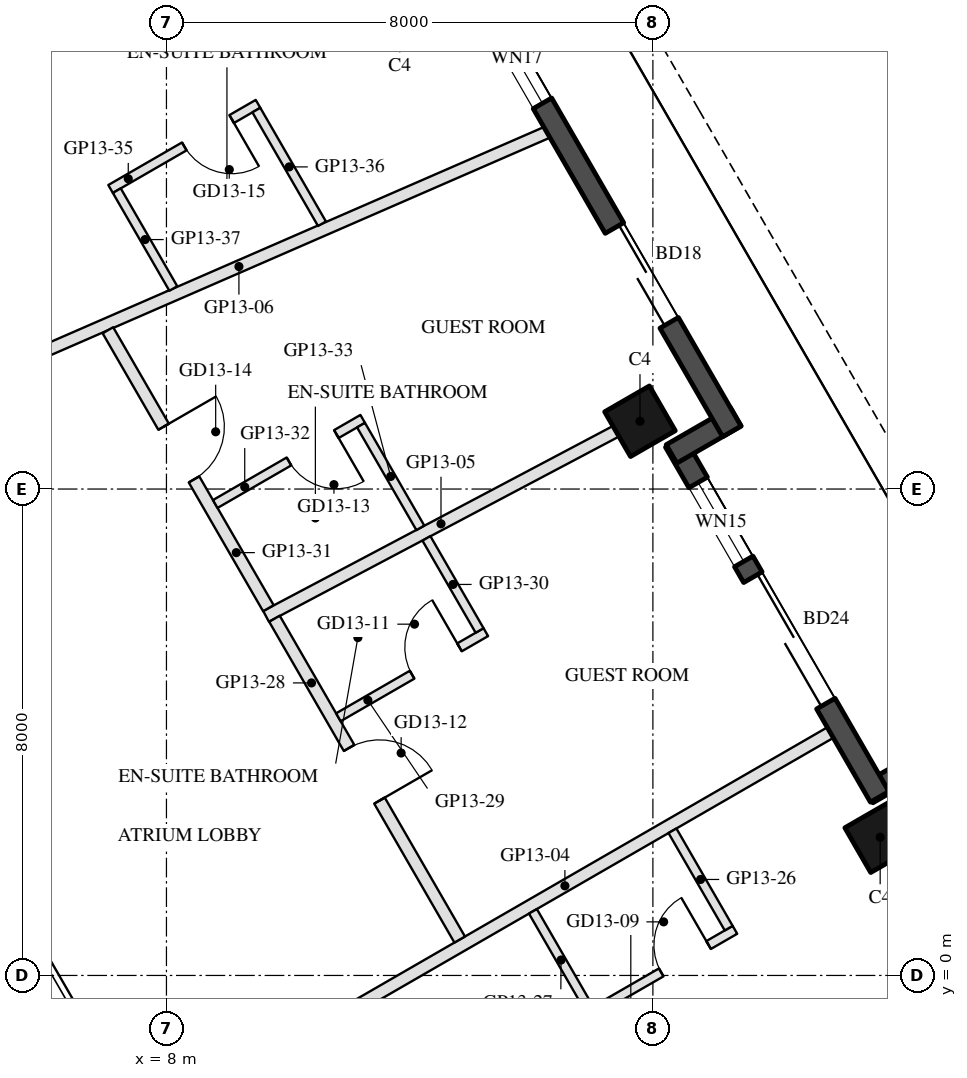
"""IFC4 building model, lengths in metres.
Left out: names, types, materials, properties, quantities, classifications, styles, units other than length and angle.
Written with IfcOpenShell. Run it as: python <this file> out.ifc"""

import sys

from ifc_helpers import new_model, si_unit, direction, frame, frame_2d, origin, origin_2d, place, context, subcontext, project, spatial, rectangle, hollow_rectangle, extrude, element, fill, save


model = new_model("IFC4")
c1 = context("Model", 3, precision=1e-05, world=origin(), true_north=direction((0.0, 1.0)))
c2 = subcontext(c1, "Body", "Model", "MODEL_VIEW")
j1 = project(units=[si_unit("LENGTHUNIT", "METRE"), si_unit("PLANEANGLEUNIT", "RADIAN")], contexts=[c1])
p1 = place(None, origin())
s1 = spatial("IfcSite", under=j1, at=p1, CompositionType="ELEMENT")
p2 = place(p1, origin())
s2 = spatial("IfcBuilding", under=s1, at=p2, CompositionType="ELEMENT")
p3 = place(p2, frame((0.0, 0.0, 154.0)))
s3 = spatial("IfcBuildingStorey", under=s2, at=p3, CompositionType="ELEMENT", Elevation=154.0)
for number, where, z_axis, x_axis in (
    (1, (19.738, 2.273, 0.0), (0.0, 0.0, 1.0), (-0.5, 0.866, 0.0)),
    (2, (15.788, 9.115, 0.0), (0.0, 0.0, 1.0), (-0.5, 0.866, 0.0)),
):
    element("IfcColumn", number, at=place(p3, frame(where, z_axis=z_axis, x_axis=x_axis)), inside=s3, PredefinedType="COLUMN", context=c2, shape_type="SweptSolid", body=[
        extrude(hollow_rectangle(XDim=0.85, YDim=0.85, WallThickness=0.04, at=origin_2d()), origin(), (0.0, 0.0, 1.0), 3.7),
    ])
p4 = place(p3, frame((20.588, 3.601, 0.0), z_axis=(0.0, 0.0, 1.0), x_axis=(-0.866005645448, -0.500034220881, 0.0)))
e3 = element("IfcWall", 3, at=p4, inside=s3, PredefinedType="SOLIDWALL", context=c2, shape_type="SweptSolid", body=[
    extrude(rectangle(XDim=1.22, YDim=0.35, at=frame_2d((0.61, 0.0))), origin(), (0.0, 0.0, 1.0), 3.55),
])
p5 = place(p3, frame((19.729, 2.938, 0.0), z_axis=(0.0, 0.0, 1.0), x_axis=(-0.499976430342, 0.866039011305, 0.0)))
e4 = element("IfcWall", 4, at=p5, inside=s3, PredefinedType="SOLIDWALL", context=c2, shape_type="SweptSolid", body=[
    extrude(rectangle(XDim=6.74, YDim=0.35, at=frame_2d((3.37, 0.0))), origin(), (0.0, 0.0, 1.0), 3.55),
])
p6 = place(p5, frame((1.77, 0.0, 0.0)))
e5 = element("IfcOpeningElement", 5, at=p6, cuts=e4, PredefinedType="OPENING", context=c2, shape_type="SweptSolid", body=[
    extrude(rectangle(XDim=2.4, YDim=2.4, at=frame_2d((1.2, 1.2))), frame((0.0, 0.185, 0.0), z_axis=(0.0, -1.0, 0.0), x_axis=(1.0, 0.0, 0.0)), (0.0, 0.0, 1.0), 0.37),
])
p7 = place(p5, frame((4.47, 0.0, 0.3)))
e6 = element("IfcOpeningElement", 6, at=p7, cuts=e4, PredefinedType="OPENING", context=c2, shape_type="SweptSolid", body=[
    extrude(rectangle(XDim=1.5, YDim=2.65, at=frame_2d((0.75, 1.325))), frame((0.0, 0.185, 0.0), z_axis=(0.0, -1.0, 0.0), x_axis=(1.0, 0.0, 0.0)), (0.0, 0.0, 1.0), 0.37),
])
p8 = place(p3, frame((16.306, 8.577, 0.0), z_axis=(0.0, 0.0, 1.0), x_axis=(0.866092288191, 0.499884134912, 0.0)))
e7 = element("IfcWall", 7, at=p8, inside=s3, PredefinedType="SOLIDWALL", context=c2, shape_type="SweptSolid", body=[
    extrude(rectangle(XDim=1.22, YDim=0.35, at=frame_2d((0.61, 0.0))), origin(), (0.0, 0.0, 1.0), 3.55),
])
p9 = place(p3, frame((17.299, 8.948, 0.0), z_axis=(0.0, 0.0, 1.0), x_axis=(-0.500010041276, 0.866019606374, 0.0)))
e8 = element("IfcWall", 8, at=p9, inside=s3, PredefinedType="SOLIDWALL", context=c2, shape_type="SweptSolid", body=[
    extrude(rectangle(XDim=9.7, YDim=0.35, at=frame_2d((4.85, 0.0))), origin(), (0.0, 0.0, 1.0), 3.55),
])
p10 = place(p9, frame((2.062, 0.0, 0.0)))
e9 = element("IfcOpeningElement", 9, at=p10, cuts=e8, PredefinedType="OPENING", context=c2, shape_type="SweptSolid", body=[
    extrude(rectangle(XDim=1.8, YDim=2.4, at=frame_2d((0.9, 1.2))), frame((0.0, 0.185, 0.0), z_axis=(0.0, -1.0, 0.0), x_axis=(1.0, 0.0, 0.0)), (0.0, 0.0, 1.0), 0.37),
])
p11 = place(p9, frame((6.23, 0.0, 0.3)))
e10 = element("IfcOpeningElement", 10, at=p11, cuts=e8, PredefinedType="OPENING", context=c2, shape_type="SweptSolid", body=[
    extrude(rectangle(XDim=1.7, YDim=2.65, at=frame_2d((0.85, 1.325))), frame((0.0, 0.185, 0.0), z_axis=(0.0, -1.0, 0.0), x_axis=(1.0, 0.0, 0.0)), (0.0, 0.0, 1.0), 0.37),
])
p12 = place(p3, frame((18.917, 3.994, 0.0), z_axis=(0.0, 0.0, 1.0), x_axis=(-0.866022637375, -0.500004791531, 0.0)))
e11 = element("IfcWall", 11, at=p12, inside=s3, PredefinedType="PARTITIONING", context=c2, shape_type="SweptSolid", body=[
    extrude(rectangle(XDim=10.08, YDim=0.2, at=frame_2d((5.04, 0.0))), origin(), (0.0, 0.0, 1.0), 3.06),
])
p13 = place(p3, frame((15.392, 8.95, 0.0), z_axis=(0.0, 0.0, 1.0), x_axis=(-0.883969397176, -0.467544762408, 0.0)))
e12 = element("IfcWall", 12, at=p13, inside=s3, PredefinedType="PARTITIONING", context=c2, shape_type="SweptSolid", body=[
    extrude(rectangle(XDim=6.51, YDim=0.2, at=frame_2d((3.255, 0.0))), origin(), (0.0, 0.0, 1.0), 2.95),
])
p14 = place(p3, frame((14.257, 13.866, 0.0), z_axis=(0.0, 0.0, 1.0), x_axis=(-0.916761733334, -0.399434505638, 0.0)))
e13 = element("IfcWall", 13, at=p14, inside=s3, PredefinedType="PARTITIONING", context=c2, shape_type="SweptSolid", body=[
    extrude(rectangle(XDim=11.05, YDim=0.2, at=frame_2d((5.525, 0.0))), origin(), (0.0, 0.0, 1.0), 3.06),
])
p15 = place(p3, frame((14.924, -0.65, 0.0), z_axis=(0.0, 0.0, 1.0), x_axis=(0.866056369097, 0.49994636267, 0.0)))
e14 = element("IfcWall", 14, at=p15, inside=s3, PredefinedType="PARTITIONING", context=c2, shape_type="SweptSolid", body=[
    extrude(rectangle(XDim=2.8, YDim=0.15, at=frame_2d((1.4, 0.0))), origin(), (0.0, 0.0, 1.0), 2.95),
])
p16 = place(p15, frame((1.4, 0.0, 0.0)))
e15 = element("IfcOpeningElement", 15, at=p16, cuts=e14, PredefinedType="OPENING", context=c2, shape_type="SweptSolid", body=[
    extrude(rectangle(XDim=0.9, YDim=2.1, at=frame_2d((0.45, 1.05))), frame((0.0, 0.085, 0.0), z_axis=(0.0, -1.0, 0.0), x_axis=(1.0, 0.0, 0.0)), (0.0, 0.0, 1.0), 0.17),
])
for number, where, z_axis, x_axis in (
    (16, (17.247, 0.778, 0.0), (0.0, 0.0, 1.0), (-0.5, 0.866, 0.0)),
    (17, (14.952, -0.547, 0.0), (0.0, 0.0, 1.0), (-0.5, 0.866, 0.0)),
):
    element("IfcWall", number, at=place(p3, frame(where, z_axis=z_axis, x_axis=x_axis)), inside=s3, PredefinedType="PARTITIONING", context=c2, shape_type="SweptSolid", body=[
        extrude(rectangle(XDim=1.85, YDim=0.15, at=frame_2d((0.925, 0.0))), origin(), (0.0, 0.0, 1.0), 2.95),
    ])
p17 = place(p3, frame((9.777, 5.867, 0.0), z_axis=(0.0, 0.0, 1.0), x_axis=(0.499996493545, -0.866027428228, 0.0)))
e18 = element("IfcWall", 18, at=p17, inside=s3, PredefinedType="PARTITIONING", context=c2, shape_type="SweptSolid", body=[
    extrude(rectangle(XDim=6.092, YDim=0.2, at=frame_2d((3.046, 0.0))), origin(), (0.0, 0.0, 1.0), 2.95),
])
p18 = place(p17, frame((2.454, 0.0, 0.0)))
e19 = element("IfcOpeningElement", 19, at=p18, cuts=e18, PredefinedType="OPENING", context=c2, shape_type="SweptSolid", body=[
    extrude(rectangle(XDim=1.0, YDim=2.1, at=frame_2d((0.5, 1.05))), frame((0.0, 0.11, 0.0), z_axis=(0.0, -1.0, 0.0), x_axis=(1.0, 0.0, 0.0)), (0.0, 0.0, 1.0), 0.22),
])
p19 = place(p3, frame((10.827, 4.246, 0.0), z_axis=(0.0, 0.0, 1.0), x_axis=(0.866018616679, 0.500011755427, 0.0)))
e20 = element("IfcWall", 20, at=p19, inside=s3, PredefinedType="PARTITIONING", context=c2, shape_type="SweptSolid", body=[
    extrude(rectangle(XDim=2.8, YDim=0.15, at=frame_2d((1.4, 0.0))), origin(), (0.0, 0.0, 1.0), 3.55),
])
p20 = place(p19, frame((1.4, 0.0, 0.0)))
e21 = element("IfcOpeningElement", 21, at=p20, cuts=e20, PredefinedType="OPENING", context=c2, shape_type="SweptSolid", body=[
    extrude(rectangle(XDim=0.9, YDim=2.1, at=frame_2d((0.45, 1.05))), frame((0.0, 0.085, 0.0), z_axis=(0.0, -1.0, 0.0), x_axis=(1.0, 0.0, 0.0)), (0.0, 0.0, 1.0), 0.17),
])
p21 = place(p3, frame((13.15, 5.674, 0.0), z_axis=(0.0, 0.0, 1.0), x_axis=(-0.500012451049, 0.866018215049, 0.0)))
e22 = element("IfcWall", 22, at=p21, inside=s3, PredefinedType="PARTITIONING", context=c2, shape_type="SweptSolid", body=[
    extrude(rectangle(XDim=1.749, YDim=0.15, at=frame_2d((0.875, 0.0))), origin(), (0.0, 0.0, 1.0), 2.95),
])
p22 = place(p3, frame((7.037, 10.611, 0.0), z_axis=(0.0, 0.0, 1.0), x_axis=(0.500004030971, -0.86602307649, 0.0)))
e23 = element("IfcWall", 23, at=p22, inside=s3, PredefinedType="PARTITIONING", context=c2, shape_type="SweptSolid", body=[
    extrude(rectangle(XDim=5.279, YDim=0.2, at=frame_2d((2.639, 0.0))), origin(), (0.0, 0.0, 1.0), 2.95),
])
p23 = place(p22, frame((1.833, 0.0, 0.0)))
e24 = element("IfcOpeningElement", 24, at=p23, cuts=e23, PredefinedType="OPENING", context=c2, shape_type="SweptSolid", body=[
    extrude(rectangle(XDim=1.0, YDim=2.1, at=frame_2d((0.5, 1.05))), frame((0.0, 0.11, 0.0), z_axis=(0.0, -1.0, 0.0), x_axis=(1.0, 0.0, 0.0)), (0.0, 0.0, 1.0), 0.22),
])
p24 = place(p3, frame((11.227, 9.154, 0.0), z_axis=(0.0, 0.0, 1.0), x_axis=(-0.866034573852, -0.49998411664, 0.0)))
e25 = element("IfcWall", 25, at=p24, inside=s3, PredefinedType="PARTITIONING", context=c2, shape_type="SweptSolid", body=[
    extrude(rectangle(XDim=2.8, YDim=0.15, at=frame_2d((1.4, 0.0))), origin(), (0.0, 0.0, 1.0), 3.55),
])
p25 = place(p24, frame((0.5, 0.0, 0.0)))
e26 = element("IfcOpeningElement", 26, at=p25, cuts=e25, PredefinedType="OPENING", context=c2, shape_type="SweptSolid", body=[
    extrude(rectangle(XDim=0.9, YDim=2.1, at=frame_2d((0.45, 1.05))), frame((0.0, 0.085, 0.0), z_axis=(0.0, -1.0, 0.0), x_axis=(1.0, 0.0, 0.0)), (0.0, 0.0, 1.0), 0.17),
])
p26 = place(p3, frame((12.175, 7.362, 0.0), z_axis=(0.0, 0.0, 1.0), x_axis=(-0.500014901547, 0.866016800201, 0.0)))
e27 = element("IfcWall", 27, at=p26, inside=s3, PredefinedType="PARTITIONING", context=c2, shape_type="SweptSolid", body=[
    extrude(rectangle(XDim=1.951, YDim=0.15, at=frame_2d((0.976, 0.0))), origin(), (0.0, 0.0, 1.0), 3.55),
])
p27 = place(p3, frame((9.506, 14.335, 0.0), z_axis=(0.0, 0.0, 1.0), x_axis=(-0.866056369097, -0.49994636267, 0.0)))
e28 = element("IfcWall", 28, at=p27, inside=s3, PredefinedType="PARTITIONING", context=c2, shape_type="SweptSolid", body=[
    extrude(rectangle(XDim=2.8, YDim=0.15, at=frame_2d((1.4, 0.0))), origin(), (0.0, 0.0, 1.0), 3.55),
])
p28 = place(p27, frame((0.5, 0.0, 0.0)))
e29 = element("IfcOpeningElement", 29, at=p28, cuts=e28, PredefinedType="OPENING", context=c2, shape_type="SweptSolid", body=[
    extrude(rectangle(XDim=0.9, YDim=2.1, at=frame_2d((0.45, 1.05))), frame((0.0, 0.085, 0.0), z_axis=(0.0, -1.0, 0.0), x_axis=(1.0, 0.0, 0.0)), (0.0, 0.0, 1.0), 0.17),
])
p29 = place(p3, frame((10.558, 12.364, 0.0), z_axis=(0.0, 0.0, 1.0), x_axis=(-0.499983569942, 0.866034889475, 0.0)))
e30 = element("IfcWall", 30, at=p29, inside=s3, PredefinedType="PARTITIONING", context=c2, shape_type="SweptSolid", body=[
    extrude(rectangle(XDim=2.158, YDim=0.15, at=frame_2d((1.079, 0.0))), origin(), (0.0, 0.0, 1.0), 3.55),
])
p30 = place(p3, frame((8.113, 11.298, 0.0), z_axis=(0.0, 0.0, 1.0), x_axis=(-0.49995366312, 0.866052154742, 0.0)))
e31 = element("IfcWall", 31, at=p30, inside=s3, PredefinedType="PARTITIONING", context=c2, shape_type="SweptSolid", body=[
    extrude(rectangle(XDim=1.859, YDim=0.15, at=frame_2d((0.929, 0.0))), origin(), (0.0, 0.0, 1.0), 3.55),
])
p31 = place(p6, frame((2.4, 0.0, 0.0), z_axis=(0.0, 0.0, 1.0), x_axis=(-1.0, 0.0, 0.0)))
e32 = element("IfcDoor", 32, at=p31, inside=s3, OperationType="SLIDING_TO_LEFT", PredefinedType="DOOR", context=c2, shape_type="SweptSolid", body=[
    extrude(rectangle(XDim=2.4, YDim=2.4, at=frame_2d((1.2, 1.2))), frame((0.0, 0.025, 0.0), z_axis=(0.0, -1.0, 0.0), x_axis=(1.0, 0.0, 0.0)), (0.0, 0.0, 1.0), 0.05),
])
fill(e5, e32)
p32 = place(p7, origin())
e33 = element("IfcWindow", 33, at=p32, inside=s3, PartitioningType="SINGLE_PANEL", PredefinedType="WINDOW", context=c2, shape_type="SweptSolid", body=[
    extrude(rectangle(XDim=1.5, YDim=2.65, at=frame_2d((0.75, 1.325))), frame((0.0, 0.03, 0.0), z_axis=(0.0, -1.0, 0.0), x_axis=(1.0, 0.0, 0.0)), (0.0, 0.0, 1.0), 0.06),
])
fill(e6, e33)
p33 = place(p10, frame((1.8, 0.0, 0.0), z_axis=(0.0, 0.0, 1.0), x_axis=(-1.0, 0.0, 0.0)))
e34 = element("IfcDoor", 34, at=p33, inside=s3, OperationType="SLIDING_TO_LEFT", PredefinedType="DOOR", context=c2, shape_type="SweptSolid", body=[
    extrude(rectangle(XDim=1.8, YDim=2.4, at=frame_2d((0.9, 1.2))), frame((0.0, 0.025, 0.0), z_axis=(0.0, -1.0, 0.0), x_axis=(1.0, 0.0, 0.0)), (0.0, 0.0, 1.0), 0.05),
])
fill(e9, e34)
p34 = place(p11, origin())
e35 = element("IfcWindow", 35, at=p34, inside=s3, PartitioningType="SINGLE_PANEL", PredefinedType="WINDOW", context=c2, shape_type="SweptSolid", body=[
    extrude(rectangle(XDim=1.7, YDim=2.65, at=frame_2d((0.85, 1.325))), frame((0.0, 0.03, 0.0), z_axis=(0.0, -1.0, 0.0), x_axis=(1.0, 0.0, 0.0)), (0.0, 0.0, 1.0), 0.06),
])
fill(e10, e35)
p35 = place(p16, origin())
e36 = element("IfcDoor", 36, at=p35, inside=s3, OperationType="SINGLE_SWING_RIGHT", PredefinedType="DOOR", context=c2, shape_type="SweptSolid", body=[
    extrude(rectangle(XDim=0.9, YDim=2.1, at=frame_2d((0.45, 1.05))), frame((0.0, 0.025, 0.0), z_axis=(0.0, -1.0, 0.0), x_axis=(1.0, 0.0, 0.0)), (0.0, 0.0, 1.0), 0.05),
])
fill(e15, e36)
p36 = place(p20, origin())
e37 = element("IfcDoor", 37, at=p36, inside=s3, OperationType="SINGLE_SWING_RIGHT", PredefinedType="DOOR", context=c2, shape_type="SweptSolid", body=[
    extrude(rectangle(XDim=0.9, YDim=2.1, at=frame_2d((0.45, 1.05))), frame((0.0, 0.025, 0.0), z_axis=(0.0, -1.0, 0.0), x_axis=(1.0, 0.0, 0.0)), (0.0, 0.0, 1.0), 0.05),
])
fill(e21, e37)
p37 = place(p18, origin())
e38 = element("IfcDoor", 38, at=p37, inside=s3, OperationType="SINGLE_SWING_RIGHT", PredefinedType="DOOR", context=c2, shape_type="SweptSolid", body=[
    extrude(rectangle(XDim=1.0, YDim=2.1, at=frame_2d((0.5, 1.05))), frame((0.0, 0.025, 0.0), z_axis=(0.0, -1.0, 0.0), x_axis=(1.0, 0.0, 0.0)), (0.0, 0.0, 1.0), 0.05),
])
fill(e19, e38)
p38 = place(p25, origin())
e39 = element("IfcDoor", 39, at=p38, inside=s3, OperationType="SINGLE_SWING_LEFT", PredefinedType="DOOR", context=c2, shape_type="SweptSolid", body=[
    extrude(rectangle(XDim=0.9, YDim=2.1, at=frame_2d((0.45, 1.05))), frame((0.0, 0.025, 0.0), z_axis=(0.0, -1.0, 0.0), x_axis=(1.0, 0.0, 0.0)), (0.0, 0.0, 1.0), 0.05),
])
fill(e26, e39)
p39 = place(p23, origin())
e40 = element("IfcDoor", 40, at=p39, inside=s3, OperationType="SINGLE_SWING_LEFT", PredefinedType="DOOR", context=c2, shape_type="SweptSolid", body=[
    extrude(rectangle(XDim=1.0, YDim=2.1, at=frame_2d((0.5, 1.05))), frame((0.0, 0.025, 0.0), z_axis=(0.0, -1.0, 0.0), x_axis=(1.0, 0.0, 0.0)), (0.0, 0.0, 1.0), 0.05),
])
fill(e24, e40)
p40 = place(p28, origin())
e41 = element("IfcDoor", 41, at=p40, inside=s3, OperationType="SINGLE_SWING_LEFT", PredefinedType="DOOR", context=c2, shape_type="SweptSolid", body=[
    extrude(rectangle(XDim=0.9, YDim=2.1, at=frame_2d((0.45, 1.05))), frame((0.0, 0.025, 0.0), z_axis=(0.0, -1.0, 0.0), x_axis=(1.0, 0.0, 0.0)), (0.0, 0.0, 1.0), 0.05),
])
fill(e29, e41)
save(model, sys.argv[1])
